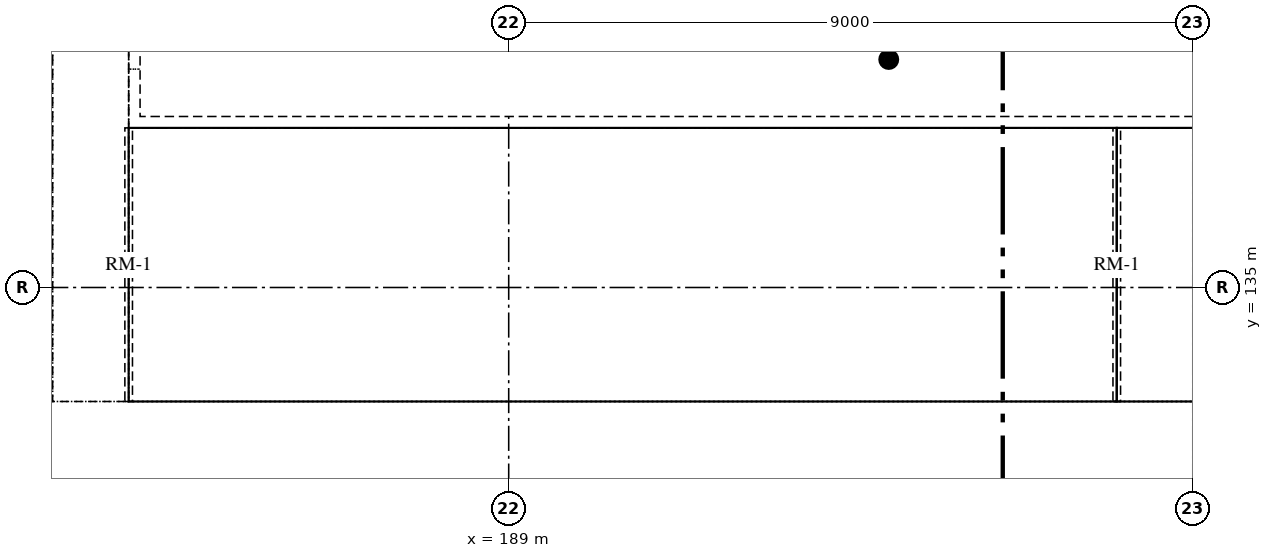
"""IFC4 building model, lengths in metres.
Left out: names, types, materials, properties, quantities, classifications, styles, units other than length and angle.
Written with IfcOpenShell. Run it as: python <this file> out.ifc"""

import sys

from ifc_helpers import new_model, si_unit, direction, frame, origin, origin_2d, place, context, subcontext, project, spatial, hollow_circle, extrude, element, save


model = new_model("IFC4")
c1 = context("Model", 3, precision=1e-05, world=origin(), true_north=direction((0.0, 1.0)))
c2 = subcontext(c1, "Body", "Model", "MODEL_VIEW")
j1 = project(units=[si_unit("LENGTHUNIT", "METRE"), si_unit("PLANEANGLEUNIT", "RADIAN")], contexts=[c1])
p1 = place(None, origin())
s1 = spatial("IfcSite", under=j1, at=p1, CompositionType="ELEMENT")
p2 = place(p1, origin())
s2 = spatial("IfcBuilding", under=s1, at=p2, CompositionType="ELEMENT")
p3 = place(p2, origin())
s3 = spatial("IfcBuildingStorey", under=s2, at=p3, CompositionType="ELEMENT", Elevation=0.0)
p4 = place(p3, frame((194.0, 138.0, -2.1), z_axis=(0.0, 0.0, 1.0), x_axis=(1.0, 0.0, 0.0)))
e1 = element("IfcColumn", 1, at=p4, inside=s3, PredefinedType="COLUMN", context=c2, shape_type="SweptSolid", body=[
    extrude(hollow_circle(Radius=0.097, WallThickness=0.008, at=origin_2d()), origin(), (0.0, 0.0, 1.0), 6.66),
])
save(model, sys.argv[1])
